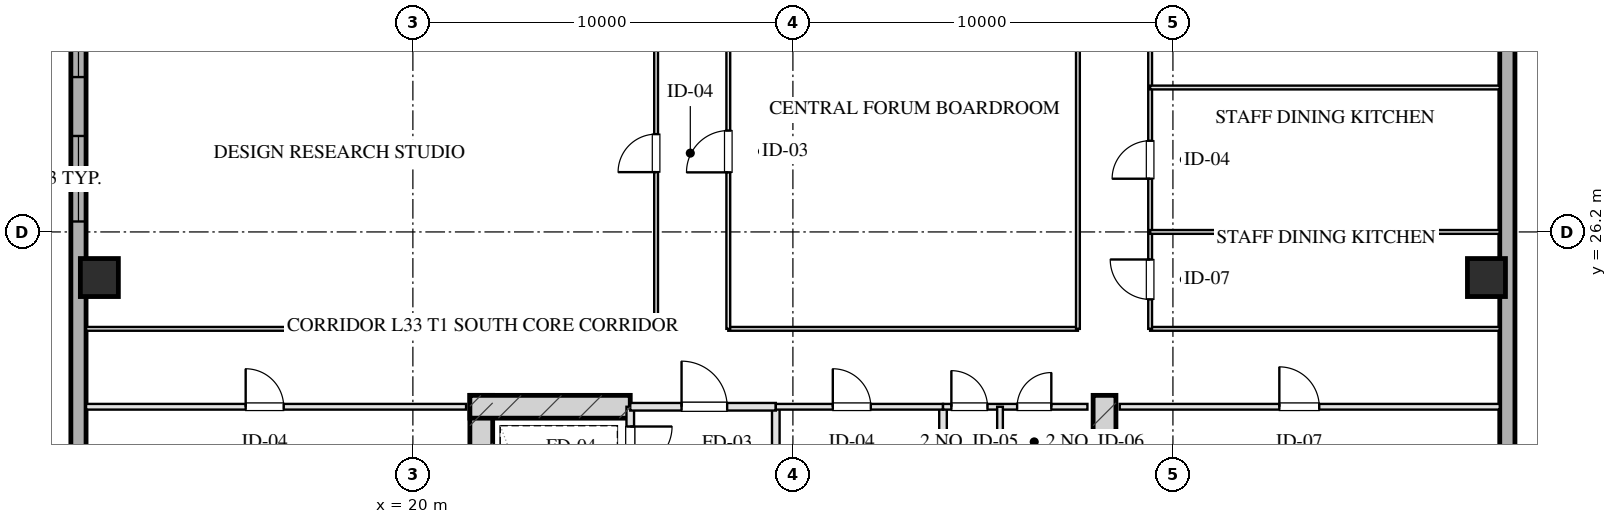
"""IFC4 building model, lengths in metres.
Left out: names, types, materials, properties, quantities, classifications, styles, units other than length and angle.
Written with IfcOpenShell. Run it as: python <this file> out.ifc"""

import sys

from ifc_helpers import new_model, si_unit, direction, frame, frame_2d, origin, origin_2d, place, context, subcontext, project, spatial, rectangle, hollow_rectangle, extrude, element, fill, save


model = new_model("IFC4")
c1 = context("Model", 3, precision=1e-05, world=origin(), true_north=direction((0.0, 1.0)))
c2 = subcontext(c1, "Body", "Model", "MODEL_VIEW")
j1 = project(units=[si_unit("LENGTHUNIT", "METRE"), si_unit("PLANEANGLEUNIT", "RADIAN")], contexts=[c1])
p1 = place(None, origin())
s1 = spatial("IfcSite", under=j1, at=p1, CompositionType="ELEMENT")
p2 = place(p1, origin())
s2 = spatial("IfcBuilding", under=s1, at=p2, CompositionType="ELEMENT")
p3 = place(p2, frame((0.0, 0.0, 127.65)))
s3 = spatial("IfcBuildingStorey", under=s2, at=p3, CompositionType="ELEMENT", Elevation=127.65)
for number, where, z_axis, x_axis in (
    (1, (21.8, 21.9, 0.0), (0.0, 0.0, 1.0), (0.0, -1.0, 0.0)),
    (2, (38.2, 21.9, 0.0), (0.0, 0.0, 1.0), (0.0, -1.0, 0.0)),
):
    element("IfcWall", number, at=place(p3, frame(where, z_axis=z_axis, x_axis=x_axis)), inside=s3, PredefinedType="SHEAR", context=c2, shape_type="SweptSolid", body=[
        extrude(rectangle(XDim=9.48, YDim=0.6, at=frame_2d((4.74, 0.0))), origin(), (0.0, 0.0, 1.0), 3.45),
    ])
p4 = place(p3, frame((21.5, 21.6, 0.0), z_axis=(0.0, 0.0, 1.0), x_axis=(1.0, 0.0, 0.0)))
e3 = element("IfcWall", 3, at=p4, inside=s3, PredefinedType="SHEAR", context=c2, shape_type="SweptSolid", body=[
    extrude(rectangle(XDim=4.22, YDim=0.6, at=frame_2d((2.11, 0.0))), origin(), (0.0, 0.0, 1.0), 3.45),
])
for number, where, z_axis, x_axis in (
    (4, (11.75, 25.0, 0.0), (0.0, 0.0, 1.0), (1.0, 0.0, 0.0)),
    (5, (48.25, 25.0, 0.0), (0.0, 0.0, 1.0), (1.0, 0.0, 0.0)),
):
    element("IfcColumn", number, at=place(p3, frame(where, z_axis=z_axis, x_axis=x_axis)), inside=s3, PredefinedType="COLUMN", context=c2, shape_type="SweptSolid", body=[
        extrude(hollow_rectangle(XDim=1.0, YDim=1.0, WallThickness=0.036, at=origin_2d()), origin(), (0.0, 0.0, 1.0), 3.451),
    ])
p5 = place(p3, frame((11.2, 9.0, 0.0), z_axis=(0.0, 0.0, 1.0), x_axis=(0.0, 1.0, 0.0)))
e6 = element("IfcWall", 6, at=p5, inside=s3, PredefinedType="SOLIDWALL", context=c2, shape_type="SweptSolid", body=[
    extrude(rectangle(XDim=50.0, YDim=0.4, at=frame_2d((25.0, 0.0))), origin(), (0.0, 0.0, 1.0), 2.61),
])
p6 = place(p5, frame((17.475, 0.0, 0.75)))
e7 = element("IfcOpeningElement", 7, at=p6, cuts=e6, PredefinedType="OPENING", context=c2, shape_type="SweptSolid", body=[
    extrude(rectangle(XDim=2.25, YDim=1.46, at=frame_2d((1.125, 0.73))), frame((0.0, 0.21, 0.0), z_axis=(0.0, -1.0, 0.0), x_axis=(1.0, 0.0, 0.0)), (0.0, 0.0, 1.0), 0.42),
])
p7 = place(p5, frame((21.275, 0.0, 0.75)))
e8 = element("IfcOpeningElement", 8, at=p7, cuts=e6, PredefinedType="OPENING", context=c2, shape_type="SweptSolid", body=[
    extrude(rectangle(XDim=2.25, YDim=1.46, at=frame_2d((1.125, 0.73))), frame((0.0, 0.21, 0.0), z_axis=(0.0, -1.0, 0.0), x_axis=(1.0, 0.0, 0.0)), (0.0, 0.0, 1.0), 0.42),
])
p8 = place(p5, frame((26.475, 0.0, 0.75)))
e9 = element("IfcOpeningElement", 9, at=p8, cuts=e6, PredefinedType="OPENING", context=c2, shape_type="SweptSolid", body=[
    extrude(rectangle(XDim=2.25, YDim=1.46, at=frame_2d((1.125, 0.73))), frame((0.0, 0.21, 0.0), z_axis=(0.0, -1.0, 0.0), x_axis=(1.0, 0.0, 0.0)), (0.0, 0.0, 1.0), 0.42),
])
p9 = place(p5, frame((30.275, 0.0, 0.75)))
e10 = element("IfcOpeningElement", 10, at=p9, cuts=e6, PredefinedType="OPENING", context=c2, shape_type="SweptSolid", body=[
    extrude(rectangle(XDim=2.25, YDim=1.46, at=frame_2d((1.125, 0.73))), frame((0.0, 0.21, 0.0), z_axis=(0.0, -1.0, 0.0), x_axis=(1.0, 0.0, 0.0)), (0.0, 0.0, 1.0), 0.42),
])
p10 = place(p3, frame((48.8, 59.0, 0.0), z_axis=(0.0, 0.0, 1.0), x_axis=(0.0, -1.0, 0.0)))
e11 = element("IfcWall", 11, at=p10, inside=s3, PredefinedType="SOLIDWALL", context=c2, shape_type="SweptSolid", body=[
    extrude(rectangle(XDim=50.0, YDim=0.4, at=frame_2d((25.0, 0.0))), origin(), (0.0, 0.0, 1.0), 2.61),
])
p11 = place(p10, frame((21.275, 0.0, 0.75)))
e12 = element("IfcOpeningElement", 12, at=p11, cuts=e11, PredefinedType="OPENING", context=c2, shape_type="SweptSolid", body=[
    extrude(rectangle(XDim=2.25, YDim=1.46, at=frame_2d((1.125, 0.73))), frame((0.0, 0.21, 0.0), z_axis=(0.0, -1.0, 0.0), x_axis=(1.0, 0.0, 0.0)), (0.0, 0.0, 1.0), 0.42),
])
p12 = place(p10, frame((17.475, 0.0, 0.75)))
e13 = element("IfcOpeningElement", 13, at=p12, cuts=e11, PredefinedType="OPENING", context=c2, shape_type="SweptSolid", body=[
    extrude(rectangle(XDim=2.25, YDim=1.46, at=frame_2d((1.125, 0.73))), frame((0.0, 0.21, 0.0), z_axis=(0.0, -1.0, 0.0), x_axis=(1.0, 0.0, 0.0)), (0.0, 0.0, 1.0), 0.42),
])
p13 = place(p3, frame((25.72, 21.6, 0.0), z_axis=(0.0, 0.0, 1.0), x_axis=(0.0, -1.0, 0.0)))
e14 = element("IfcWall", 14, at=p13, inside=s3, PredefinedType="PARTITIONING", context=c2, shape_type="SweptSolid", body=[
    extrude(rectangle(XDim=1.9, YDim=0.2, at=frame_2d((0.95, 0.0))), origin(), (0.0, 0.0, 1.0), 3.175),
])
p14 = place(p13, frame((0.52, 0.0, 0.0)))
e15 = element("IfcOpeningElement", 15, at=p14, cuts=e14, PredefinedType="OPENING", context=c2, shape_type="SweptSolid", body=[
    extrude(rectangle(XDim=1.1, YDim=2.05, at=frame_2d((0.55, 1.025))), frame((0.0, 0.11, 0.0), z_axis=(0.0, -1.0, 0.0), x_axis=(1.0, 0.0, 0.0)), (0.0, 0.0, 1.0), 0.22),
])
p15 = place(p3, frame((29.55, 21.6, 0.0), z_axis=(0.0, 0.0, 1.0), x_axis=(0.0, -1.0, 0.0)))
e16 = element("IfcWall", 16, at=p15, inside=s3, PredefinedType="PARTITIONING", context=c2, shape_type="SweptSolid", body=[
    extrude(rectangle(XDim=8.43, YDim=0.2, at=frame_2d((4.215, 0.0))), origin(), (0.0, 0.0, 1.0), 3.175),
])
p16 = place(p3, frame((25.72, 21.6, 0.0), z_axis=(0.0, 0.0, 1.0), x_axis=(1.0, 0.0, 0.0)))
e17 = element("IfcWall", 17, at=p16, inside=s3, PredefinedType="PARTITIONING", context=c2, shape_type="SweptSolid", body=[
    extrude(rectangle(XDim=3.83, YDim=0.2, at=frame_2d((1.915, 0.0))), origin(), (0.0, 0.0, 1.0), 3.175),
])
p17 = place(p16, frame((1.35, 0.0, 0.0)))
e18 = element("IfcOpeningElement", 18, at=p17, cuts=e17, PredefinedType="OPENING", context=c2, shape_type="SweptSolid", body=[
    extrude(rectangle(XDim=1.2, YDim=2.05, at=frame_2d((0.6, 1.025))), frame((0.0, 0.11, 0.0), z_axis=(0.0, -1.0, 0.0), x_axis=(1.0, 0.0, 0.0)), (0.0, 0.0, 1.0), 0.22),
])
p18 = place(p3, frame((33.95, 21.6, 0.0), z_axis=(0.0, 0.0, 1.0), x_axis=(0.0, -1.0, 0.0)))
e19 = element("IfcWall", 19, at=p18, inside=s3, PredefinedType="PARTITIONING", context=c2, shape_type="SweptSolid", body=[
    extrude(rectangle(XDim=8.43, YDim=0.2, at=frame_2d((4.215, 0.0))), origin(), (0.0, 0.0, 1.0), 3.175),
])
p19 = place(p3, frame((29.55, 21.6, 0.0), z_axis=(0.0, 0.0, 1.0), x_axis=(1.0, 0.0, 0.0)))
e20 = element("IfcWall", 20, at=p19, inside=s3, PredefinedType="PARTITIONING", context=c2, shape_type="SweptSolid", body=[
    extrude(rectangle(XDim=4.4, YDim=0.15, at=frame_2d((2.2, 0.0))), origin(), (0.0, 0.0, 1.0), 3.175),
])
p20 = place(p19, frame((1.5, 0.0, 0.0)))
e21 = element("IfcOpeningElement", 21, at=p20, cuts=e20, PredefinedType="OPENING", context=c2, shape_type="SweptSolid", body=[
    extrude(rectangle(XDim=1.0, YDim=2.05, at=frame_2d((0.5, 1.025))), frame((0.0, 0.085, 0.0), z_axis=(0.0, -1.0, 0.0), x_axis=(1.0, 0.0, 0.0)), (0.0, 0.0, 1.0), 0.17),
])
p21 = place(p3, frame((33.95, 21.6, 0.0), z_axis=(0.0, 0.0, 1.0), x_axis=(1.0, 0.0, 0.0)))
e22 = element("IfcWall", 22, at=p21, inside=s3, PredefinedType="PARTITIONING", context=c2, shape_type="SweptSolid", body=[
    extrude(rectangle(XDim=3.8, YDim=0.15, at=frame_2d((1.9, 0.0))), origin(), (0.0, 0.0, 1.0), 3.175),
])
p22 = place(p21, frame((0.22, 0.0, 0.0)))
e23 = element("IfcOpeningElement", 23, at=p22, cuts=e22, PredefinedType="OPENING", context=c2, shape_type="SweptSolid", body=[
    extrude(rectangle(XDim=0.95, YDim=2.05, at=frame_2d((0.475, 1.025))), frame((0.0, 0.085, 0.0), z_axis=(0.0, -1.0, 0.0), x_axis=(1.0, 0.0, 0.0)), (0.0, 0.0, 1.0), 0.17),
])
p23 = place(p21, frame((1.95, 0.0, 0.0)))
e24 = element("IfcOpeningElement", 24, at=p23, cuts=e22, PredefinedType="OPENING", context=c2, shape_type="SweptSolid", body=[
    extrude(rectangle(XDim=0.9, YDim=2.05, at=frame_2d((0.45, 1.025))), frame((0.0, 0.085, 0.0), z_axis=(0.0, -1.0, 0.0), x_axis=(1.0, 0.0, 0.0)), (0.0, 0.0, 1.0), 0.17),
])
p24 = place(p3, frame((35.45, 21.6, 0.0), z_axis=(0.0, 0.0, 1.0), x_axis=(0.0, -1.0, 0.0)))
e25 = element("IfcWall", 25, at=p24, inside=s3, PredefinedType="PARTITIONING", context=c2, shape_type="SweptSolid", body=[
    extrude(rectangle(XDim=8.43, YDim=0.15, at=frame_2d((4.215, 0.0))), origin(), (0.0, 0.0, 1.0), 2.815),
])
p25 = place(p24, frame((2.55, 0.0, 0.0)))
e26 = element("IfcOpeningElement", 26, at=p25, cuts=e25, PredefinedType="OPENING", context=c2, shape_type="SweptSolid", body=[
    extrude(rectangle(XDim=0.95, YDim=2.05, at=frame_2d((0.475, 1.025))), frame((0.0, 0.085, 0.0), z_axis=(0.0, -1.0, 0.0), x_axis=(1.0, 0.0, 0.0)), (0.0, 0.0, 1.0), 0.17),
])
p26 = place(p24, frame((5.6, 0.0, 0.0)))
e27 = element("IfcOpeningElement", 27, at=p26, cuts=e25, PredefinedType="OPENING", context=c2, shape_type="SweptSolid", body=[
    extrude(rectangle(XDim=0.9, YDim=2.05, at=frame_2d((0.45, 1.025))), frame((0.0, 0.085, 0.0), z_axis=(0.0, -1.0, 0.0), x_axis=(1.0, 0.0, 0.0)), (0.0, 0.0, 1.0), 0.17),
])
p27 = place(p3, frame((11.4, 21.6, 0.0), z_axis=(0.0, 0.0, 1.0), x_axis=(1.0, 0.0, 0.0)))
e28 = element("IfcWall", 28, at=p27, inside=s3, PredefinedType="PARTITIONING", context=c2, shape_type="SweptSolid", body=[
    extrude(rectangle(XDim=10.0, YDim=0.15, at=frame_2d((5.0, 0.0))), origin(), (0.0, 0.0, 1.0), 3.175),
])
p28 = place(p27, frame((4.2, 0.0, 0.0)))
e29 = element("IfcOpeningElement", 29, at=p28, cuts=e28, PredefinedType="OPENING", context=c2, shape_type="SweptSolid", body=[
    extrude(rectangle(XDim=1.0, YDim=2.05, at=frame_2d((0.5, 1.025))), frame((0.0, 0.085, 0.0), z_axis=(0.0, -1.0, 0.0), x_axis=(1.0, 0.0, 0.0)), (0.0, 0.0, 1.0), 0.17),
])
p29 = place(p3, frame((38.6, 21.6, 0.0), z_axis=(0.0, 0.0, 1.0), x_axis=(1.0, 0.0, 0.0)))
e30 = element("IfcWall", 30, at=p29, inside=s3, PredefinedType="PARTITIONING", context=c2, shape_type="SweptSolid", body=[
    extrude(rectangle(XDim=10.0, YDim=0.15, at=frame_2d((5.0, 0.0))), origin(), (0.0, 0.0, 1.0), 3.175),
])
p30 = place(p29, frame((4.2, 0.0, 0.0)))
e31 = element("IfcOpeningElement", 31, at=p30, cuts=e30, PredefinedType="OPENING", context=c2, shape_type="SweptSolid", body=[
    extrude(rectangle(XDim=1.05, YDim=2.05, at=frame_2d((0.525, 1.025))), frame((0.0, 0.085, 0.0), z_axis=(0.0, -1.0, 0.0), x_axis=(1.0, 0.0, 0.0)), (0.0, 0.0, 1.0), 0.17),
])
p31 = place(p3, frame((11.4, 23.65, 0.0), z_axis=(0.0, 0.0, 1.0), x_axis=(1.0, 0.0, 0.0)))
e32 = element("IfcWall", 32, at=p31, inside=s3, PredefinedType="MOVABLE", context=c2, shape_type="SweptSolid", body=[
    extrude(rectangle(XDim=15.0, YDim=0.1, at=frame_2d((7.5, 0.0))), origin(), (0.0, 0.0, 1.0), 3.175),
])
p32 = place(p3, frame((28.3, 23.65, 0.0), z_axis=(0.0, 0.0, 1.0), x_axis=(1.0, 0.0, 0.0)))
e33 = element("IfcWall", 33, at=p32, inside=s3, PredefinedType="MOVABLE", context=c2, shape_type="SweptSolid", body=[
    extrude(rectangle(XDim=9.2, YDim=0.1, at=frame_2d((4.6, 0.0))), origin(), (0.0, 0.0, 1.0), 3.175),
])
p33 = place(p3, frame((39.4, 23.65, 0.0), z_axis=(0.0, 0.0, 1.0), x_axis=(1.0, 0.0, 0.0)))
e34 = element("IfcWall", 34, at=p33, inside=s3, PredefinedType="MOVABLE", context=c2, shape_type="SweptSolid", body=[
    extrude(rectangle(XDim=9.2, YDim=0.1, at=frame_2d((4.6, 0.0))), origin(), (0.0, 0.0, 1.0), 3.175),
])
p34 = place(p3, frame((26.4, 23.65, 0.0), z_axis=(0.0, 0.0, 1.0), x_axis=(0.0, 1.0, 0.0)))
e35 = element("IfcWall", 35, at=p34, inside=s3, PredefinedType="MOVABLE", context=c2, shape_type="SweptSolid", body=[
    extrude(rectangle(XDim=20.7, YDim=0.1, at=frame_2d((10.35, 0.0))), origin(), (0.0, 0.0, 1.0), 3.175),
])
p35 = place(p34, frame((4.124, 0.0, 0.0)))
e36 = element("IfcOpeningElement", 36, at=p35, cuts=e35, PredefinedType="OPENING", context=c2, shape_type="SweptSolid", body=[
    extrude(rectangle(XDim=1.0, YDim=2.05, at=frame_2d((0.5, 1.025))), frame((0.0, 0.06, 0.0), z_axis=(0.0, -1.0, 0.0), x_axis=(1.0, 0.0, 0.0)), (0.0, 0.0, 1.0), 0.12),
])
p36 = place(p34, frame((14.473, 0.0, 0.0)))
e37 = element("IfcOpeningElement", 37, at=p36, cuts=e35, PredefinedType="OPENING", context=c2, shape_type="SweptSolid", body=[
    extrude(rectangle(XDim=1.0, YDim=2.05, at=frame_2d((0.5, 1.025))), frame((0.0, 0.06, 0.0), z_axis=(0.0, -1.0, 0.0), x_axis=(1.0, 0.0, 0.0)), (0.0, 0.0, 1.0), 0.12),
])
p37 = place(p3, frame((28.3, 23.65, 0.0), z_axis=(0.0, 0.0, 1.0), x_axis=(0.0, 1.0, 0.0)))
e38 = element("IfcWall", 38, at=p37, inside=s3, PredefinedType="MOVABLE", context=c2, shape_type="SweptSolid", body=[
    extrude(rectangle(XDim=20.7, YDim=0.1, at=frame_2d((10.35, 0.0))), origin(), (0.0, 0.0, 1.0), 3.175),
])
p38 = place(p37, frame((4.117, 0.0, 0.0)))
e39 = element("IfcOpeningElement", 39, at=p38, cuts=e38, PredefinedType="OPENING", context=c2, shape_type="SweptSolid", body=[
    extrude(rectangle(XDim=1.1, YDim=2.05, at=frame_2d((0.55, 1.025))), frame((0.0, 0.06, 0.0), z_axis=(0.0, -1.0, 0.0), x_axis=(1.0, 0.0, 0.0)), (0.0, 0.0, 1.0), 0.12),
])
p39 = place(p37, frame((14.347, 0.0, 0.0)))
e40 = element("IfcOpeningElement", 40, at=p39, cuts=e38, PredefinedType="OPENING", context=c2, shape_type="SweptSolid", body=[
    extrude(rectangle(XDim=1.1, YDim=2.05, at=frame_2d((0.55, 1.025))), frame((0.0, 0.06, 0.0), z_axis=(0.0, -1.0, 0.0), x_axis=(1.0, 0.0, 0.0)), (0.0, 0.0, 1.0), 0.12),
])
p40 = place(p3, frame((37.5, 23.65, 0.0), z_axis=(0.0, 0.0, 1.0), x_axis=(0.0, 1.0, 0.0)))
e41 = element("IfcWall", 41, at=p40, inside=s3, PredefinedType="MOVABLE", context=c2, shape_type="SweptSolid", body=[
    extrude(rectangle(XDim=20.7, YDim=0.1, at=frame_2d((10.35, 0.0))), origin(), (0.0, 0.0, 1.0), 3.175),
])
p41 = place(p3, frame((39.4, 23.65, 0.0), z_axis=(0.0, 0.0, 1.0), x_axis=(0.0, 1.0, 0.0)))
e42 = element("IfcWall", 42, at=p41, inside=s3, PredefinedType="MOVABLE", context=c2, shape_type="SweptSolid", body=[
    extrude(rectangle(XDim=20.7, YDim=0.1, at=frame_2d((10.35, 0.0))), origin(), (0.0, 0.0, 1.0), 3.175),
])
p42 = place(p41, frame((0.775, 0.0, 0.0)))
e43 = element("IfcOpeningElement", 43, at=p42, cuts=e42, PredefinedType="OPENING", context=c2, shape_type="SweptSolid", body=[
    extrude(rectangle(XDim=1.05, YDim=2.05, at=frame_2d((0.525, 1.025))), frame((0.0, 0.06, 0.0), z_axis=(0.0, -1.0, 0.0), x_axis=(1.0, 0.0, 0.0)), (0.0, 0.0, 1.0), 0.12),
])
p43 = place(p41, frame((3.95, 0.0, 0.0)))
e44 = element("IfcOpeningElement", 44, at=p43, cuts=e42, PredefinedType="OPENING", context=c2, shape_type="SweptSolid", body=[
    extrude(rectangle(XDim=1.0, YDim=2.05, at=frame_2d((0.5, 1.025))), frame((0.0, 0.06, 0.0), z_axis=(0.0, -1.0, 0.0), x_axis=(1.0, 0.0, 0.0)), (0.0, 0.0, 1.0), 0.12),
])
p44 = place(p41, frame((8.298, 0.0, 0.0)))
e45 = element("IfcOpeningElement", 45, at=p44, cuts=e42, PredefinedType="OPENING", context=c2, shape_type="SweptSolid", body=[
    extrude(rectangle(XDim=1.0, YDim=2.05, at=frame_2d((0.5, 1.025))), frame((0.0, 0.06, 0.0), z_axis=(0.0, -1.0, 0.0), x_axis=(1.0, 0.0, 0.0)), (0.0, 0.0, 1.0), 0.12),
])
p45 = place(p41, frame((12.712, 0.0, 0.0)))
e46 = element("IfcOpeningElement", 46, at=p45, cuts=e42, PredefinedType="OPENING", context=c2, shape_type="SweptSolid", body=[
    extrude(rectangle(XDim=1.0, YDim=2.05, at=frame_2d((0.5, 1.025))), frame((0.0, 0.06, 0.0), z_axis=(0.0, -1.0, 0.0), x_axis=(1.0, 0.0, 0.0)), (0.0, 0.0, 1.0), 0.12),
])
p46 = place(p41, frame((16.231, 0.0, 0.0)))
e47 = element("IfcOpeningElement", 47, at=p46, cuts=e42, PredefinedType="OPENING", context=c2, shape_type="SweptSolid", body=[
    extrude(rectangle(XDim=1.0, YDim=2.05, at=frame_2d((0.5, 1.025))), frame((0.0, 0.06, 0.0), z_axis=(0.0, -1.0, 0.0), x_axis=(1.0, 0.0, 0.0)), (0.0, 0.0, 1.0), 0.12),
])
p47 = place(p41, frame((18.992, 0.0, 0.0)))
e48 = element("IfcOpeningElement", 48, at=p47, cuts=e42, PredefinedType="OPENING", context=c2, shape_type="SweptSolid", body=[
    extrude(rectangle(XDim=1.0, YDim=2.05, at=frame_2d((0.5, 1.025))), frame((0.0, 0.06, 0.0), z_axis=(0.0, -1.0, 0.0), x_axis=(1.0, 0.0, 0.0)), (0.0, 0.0, 1.0), 0.12),
])
for number, where, z_axis, x_axis in (
    (49, (39.4, 26.2, 0.0), (0.0, 0.0, 1.0), (1.0, 0.0, 0.0)),
    (50, (39.4, 30.0, 0.0), (0.0, 0.0, 1.0), (1.0, 0.0, 0.0)),
):
    element("IfcWall", number, at=place(p3, frame(where, z_axis=z_axis, x_axis=x_axis)), inside=s3, PredefinedType="MOVABLE", context=c2, shape_type="SweptSolid", body=[
        extrude(rectangle(XDim=9.2, YDim=0.1, at=frame_2d((4.6, 0.0))), origin(), (0.0, 0.0, 1.0), 3.175),
    ])
p48 = place(p6, origin())
e51 = element("IfcWindow", 51, at=p48, inside=s3, PartitioningType="TRIPLE_PANEL_VERTICAL", PredefinedType="WINDOW", context=c2, shape_type="SweptSolid", body=[
    extrude(rectangle(XDim=2.25, YDim=1.46, at=frame_2d((1.125, 0.73))), frame((0.0, 0.03, 0.0), z_axis=(0.0, -1.0, 0.0), x_axis=(1.0, 0.0, 0.0)), (0.0, 0.0, 1.0), 0.06),
])
fill(e7, e51)
p49 = place(p7, origin())
e52 = element("IfcWindow", 52, at=p49, inside=s3, PartitioningType="TRIPLE_PANEL_VERTICAL", PredefinedType="WINDOW", context=c2, shape_type="SweptSolid", body=[
    extrude(rectangle(XDim=2.25, YDim=1.46, at=frame_2d((1.125, 0.73))), frame((0.0, 0.03, 0.0), z_axis=(0.0, -1.0, 0.0), x_axis=(1.0, 0.0, 0.0)), (0.0, 0.0, 1.0), 0.06),
])
fill(e8, e52)
p50 = place(p14, origin())
e53 = element("IfcDoor", 53, at=p50, inside=s3, OperationType="SINGLE_SWING_LEFT", PredefinedType="DOOR", context=c2, shape_type="SweptSolid", body=[
    extrude(rectangle(XDim=1.1, YDim=2.05, at=frame_2d((0.55, 1.025))), frame((0.0, 0.025, 0.0), z_axis=(0.0, -1.0, 0.0), x_axis=(1.0, 0.0, 0.0)), (0.0, 0.0, 1.0), 0.05),
])
fill(e15, e53)
p51 = place(p17, origin())
e54 = element("IfcDoor", 54, at=p51, inside=s3, OperationType="SINGLE_SWING_LEFT", PredefinedType="DOOR", context=c2, shape_type="SweptSolid", body=[
    extrude(rectangle(XDim=1.2, YDim=2.05, at=frame_2d((0.6, 1.025))), frame((0.0, 0.025, 0.0), z_axis=(0.0, -1.0, 0.0), x_axis=(1.0, 0.0, 0.0)), (0.0, 0.0, 1.0), 0.05),
])
fill(e18, e54)
p52 = place(p20, origin())
e55 = element("IfcDoor", 55, at=p52, inside=s3, OperationType="SINGLE_SWING_LEFT", PredefinedType="DOOR", context=c2, shape_type="SweptSolid", body=[
    extrude(rectangle(XDim=1.0, YDim=2.05, at=frame_2d((0.5, 1.025))), frame((0.0, 0.025, 0.0), z_axis=(0.0, -1.0, 0.0), x_axis=(1.0, 0.0, 0.0)), (0.0, 0.0, 1.0), 0.05),
])
fill(e21, e55)
p53 = place(p22, origin())
e56 = element("IfcDoor", 56, at=p53, inside=s3, OperationType="SINGLE_SWING_LEFT", PredefinedType="DOOR", context=c2, shape_type="SweptSolid", body=[
    extrude(rectangle(XDim=0.95, YDim=2.05, at=frame_2d((0.475, 1.025))), frame((0.0, 0.025, 0.0), z_axis=(0.0, -1.0, 0.0), x_axis=(1.0, 0.0, 0.0)), (0.0, 0.0, 1.0), 0.05),
])
fill(e23, e56)
p54 = place(p23, origin())
e57 = element("IfcDoor", 57, at=p54, inside=s3, OperationType="SINGLE_SWING_RIGHT", PredefinedType="DOOR", context=c2, shape_type="SweptSolid", body=[
    extrude(rectangle(XDim=0.9, YDim=2.05, at=frame_2d((0.45, 1.025))), frame((0.0, 0.025, 0.0), z_axis=(0.0, -1.0, 0.0), x_axis=(1.0, 0.0, 0.0)), (0.0, 0.0, 1.0), 0.05),
])
fill(e24, e57)
p55 = place(p28, origin())
e58 = element("IfcDoor", 58, at=p55, inside=s3, OperationType="SINGLE_SWING_LEFT", PredefinedType="DOOR", context=c2, shape_type="SweptSolid", body=[
    extrude(rectangle(XDim=1.0, YDim=2.05, at=frame_2d((0.5, 1.025))), frame((0.0, 0.025, 0.0), z_axis=(0.0, -1.0, 0.0), x_axis=(1.0, 0.0, 0.0)), (0.0, 0.0, 1.0), 0.05),
])
fill(e29, e58)
p56 = place(p30, origin())
e59 = element("IfcDoor", 59, at=p56, inside=s3, OperationType="SINGLE_SWING_LEFT", PredefinedType="DOOR", context=c2, shape_type="SweptSolid", body=[
    extrude(rectangle(XDim=1.05, YDim=2.05, at=frame_2d((0.525, 1.025))), frame((0.0, 0.025, 0.0), z_axis=(0.0, -1.0, 0.0), x_axis=(1.0, 0.0, 0.0)), (0.0, 0.0, 1.0), 0.05),
])
fill(e31, e59)
p57 = place(p35, origin())
e60 = element("IfcDoor", 60, at=p57, inside=s3, OperationType="SINGLE_SWING_LEFT", PredefinedType="DOOR", context=c2, shape_type="SweptSolid", body=[
    extrude(rectangle(XDim=1.0, YDim=2.05, at=frame_2d((0.5, 1.025))), frame((0.0, 0.025, 0.0), z_axis=(0.0, -1.0, 0.0), x_axis=(1.0, 0.0, 0.0)), (0.0, 0.0, 1.0), 0.05),
])
fill(e36, e60)
p58 = place(p38, origin())
e61 = element("IfcDoor", 61, at=p58, inside=s3, OperationType="SINGLE_SWING_LEFT", PredefinedType="DOOR", context=c2, shape_type="SweptSolid", body=[
    extrude(rectangle(XDim=1.1, YDim=2.05, at=frame_2d((0.55, 1.025))), frame((0.0, 0.025, 0.0), z_axis=(0.0, -1.0, 0.0), x_axis=(1.0, 0.0, 0.0)), (0.0, 0.0, 1.0), 0.05),
])
fill(e39, e61)
p59 = place(p42, origin())
e62 = element("IfcDoor", 62, at=p59, inside=s3, OperationType="SINGLE_SWING_RIGHT", PredefinedType="DOOR", context=c2, shape_type="SweptSolid", body=[
    extrude(rectangle(XDim=1.05, YDim=2.05, at=frame_2d((0.525, 1.025))), frame((0.0, 0.025, 0.0), z_axis=(0.0, -1.0, 0.0), x_axis=(1.0, 0.0, 0.0)), (0.0, 0.0, 1.0), 0.05),
])
fill(e43, e62)
p60 = place(p43, origin())
e63 = element("IfcDoor", 63, at=p60, inside=s3, OperationType="SINGLE_SWING_LEFT", PredefinedType="DOOR", context=c2, shape_type="SweptSolid", body=[
    extrude(rectangle(XDim=1.0, YDim=2.05, at=frame_2d((0.5, 1.025))), frame((0.0, 0.025, 0.0), z_axis=(0.0, -1.0, 0.0), x_axis=(1.0, 0.0, 0.0)), (0.0, 0.0, 1.0), 0.05),
])
fill(e44, e63)
save(model, sys.argv[1])
